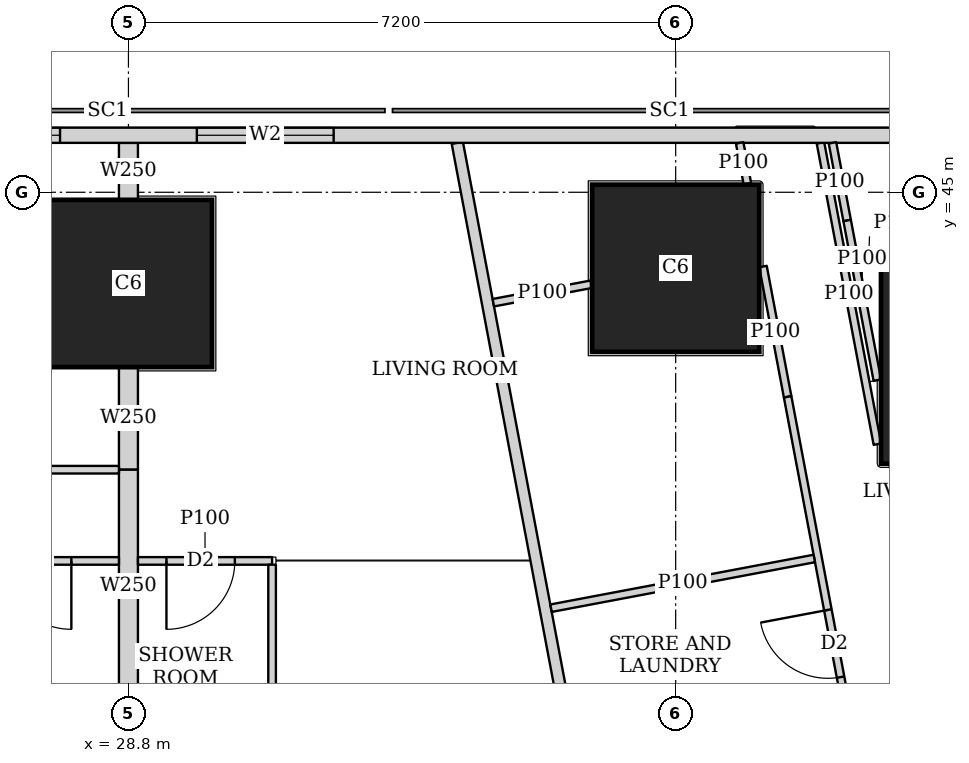
"""IFC4 building model, lengths in metres.
Left out: names, types, materials, properties, quantities, classifications, styles, units other than length and angle.
Written with IfcOpenShell. Run it as: python <this file> out.ifc"""

import sys

from ifc_helpers import new_model, si_unit, direction, frame, frame_2d, origin, origin_2d, place, context, subcontext, project, spatial, rectangle, extrude, element, fill, save


model = new_model("IFC4")
c1 = context("Model", 3, precision=1e-05, world=origin(), true_north=direction((0.0, 1.0)))
c2 = subcontext(c1, "Body", "Model", "MODEL_VIEW")
j1 = project(units=[si_unit("LENGTHUNIT", "METRE"), si_unit("PLANEANGLEUNIT", "RADIAN")], contexts=[c1])
p1 = place(None, origin())
s1 = spatial("IfcSite", under=j1, at=p1, CompositionType="ELEMENT")
p2 = place(p1, origin())
s2 = spatial("IfcBuilding", under=s1, at=p2, CompositionType="ELEMENT")
p3 = place(p2, frame((0.0, 0.0, 111.65)))
s3 = spatial("IfcBuildingStorey", under=s2, at=p3, CompositionType="ELEMENT", Elevation=111.65)
p4 = place(p3, frame((40.102, 42.83, 0.0), z_axis=(0.0, 0.0, 1.0), x_axis=(1.0, 0.0, 0.0)))
e1 = element("IfcColumn", 1, at=p4, inside=s3, PredefinedType="COLUMN", context=c2, shape_type="SweptSolid", body=[
    extrude(rectangle(XDim=2.8, YDim=2.8, at=origin_2d()), origin(), (0.0, 0.0, 1.0), 3.75),
])
for number, where, z_axis, x_axis in (
    (2, (28.8, 43.8, 0.0), (0.0, 0.0, 1.0), (1.0, 0.0, 0.0)),
    (3, (36.0, 44.0, 0.0), (0.0, 0.0, 1.0), (1.0, 0.0, 0.0)),
):
    element("IfcColumn", number, at=place(p3, frame(where, z_axis=z_axis, x_axis=x_axis)), inside=s3, PredefinedType="COLUMN", context=c2, shape_type="SweptSolid", body=[
        extrude(rectangle(XDim=2.2, YDim=2.2, at=origin_2d()), origin(), (0.0, 0.0, 1.0), 3.75),
    ])
p5 = place(p3, frame((40.106, 45.75, 0.0), z_axis=(0.0, 0.0, 1.0), x_axis=(-1.0, 0.0, 0.0)))
e4 = element("IfcWall", 4, at=p5, inside=s3, PredefinedType="SOLIDWALL", context=c2, shape_type="SweptSolid", body=[
    extrude(rectangle(XDim=37.943, YDim=0.2, at=frame_2d((18.971, 0.0))), origin(), (0.0, 0.0, 1.0), 3.5),
])
p6 = place(p5, frame((8.606, 0.0, 0.9)))
e5 = element("IfcOpeningElement", 5, at=p6, cuts=e4, PredefinedType="OPENING", context=c2, shape_type="SweptSolid", body=[
    extrude(rectangle(XDim=1.8, YDim=1.5, at=frame_2d((0.9, 0.75))), frame((0.0, 0.11, 0.0), z_axis=(0.0, -1.0, 0.0), x_axis=(1.0, 0.0, 0.0)), (0.0, 0.0, 1.0), 0.22),
])
p7 = place(p5, frame((12.206, 0.0, 0.9)))
e6 = element("IfcOpeningElement", 6, at=p7, cuts=e4, PredefinedType="OPENING", context=c2, shape_type="SweptSolid", body=[
    extrude(rectangle(XDim=1.8, YDim=1.5, at=frame_2d((0.9, 0.75))), frame((0.0, 0.11, 0.0), z_axis=(0.0, -1.0, 0.0), x_axis=(1.0, 0.0, 0.0)), (0.0, 0.0, 1.0), 0.22),
])
p8 = place(p5, frame((15.806, 0.0, 0.9)))
e7 = element("IfcOpeningElement", 7, at=p8, cuts=e4, PredefinedType="OPENING", context=c2, shape_type="SweptSolid", body=[
    extrude(rectangle(XDim=1.8, YDim=1.5, at=frame_2d((0.9, 0.75))), frame((0.0, 0.11, 0.0), z_axis=(0.0, -1.0, 0.0), x_axis=(1.0, 0.0, 0.0)), (0.0, 0.0, 1.0), 0.22),
])
p9 = place(p5, frame((19.406, 0.0, 0.9)))
e8 = element("IfcOpeningElement", 8, at=p9, cuts=e4, PredefinedType="OPENING", context=c2, shape_type="SweptSolid", body=[
    extrude(rectangle(XDim=1.8, YDim=1.5, at=frame_2d((0.9, 0.75))), frame((0.0, 0.11, 0.0), z_axis=(0.0, -1.0, 0.0), x_axis=(1.0, 0.0, 0.0)), (0.0, 0.0, 1.0), 0.22),
])
p10 = place(p5, frame((23.006, 0.0, 0.9)))
e9 = element("IfcOpeningElement", 9, at=p10, cuts=e4, PredefinedType="OPENING", context=c2, shape_type="SweptSolid", body=[
    extrude(rectangle(XDim=1.8, YDim=1.5, at=frame_2d((0.9, 0.75))), frame((0.0, 0.11, 0.0), z_axis=(0.0, -1.0, 0.0), x_axis=(1.0, 0.0, 0.0)), (0.0, 0.0, 1.0), 0.22),
])
p11 = place(p5, frame((26.606, 0.0, 0.9)))
e10 = element("IfcOpeningElement", 10, at=p11, cuts=e4, PredefinedType="OPENING", context=c2, shape_type="SweptSolid", body=[
    extrude(rectangle(XDim=1.8, YDim=1.5, at=frame_2d((0.9, 0.75))), frame((0.0, 0.11, 0.0), z_axis=(0.0, -1.0, 0.0), x_axis=(1.0, 0.0, 0.0)), (0.0, 0.0, 1.0), 0.22),
])
p12 = place(p3, frame((33.127, 45.65, 0.0), z_axis=(0.0, 0.0, 1.0), x_axis=(0.185598547723, -0.98262565562, 0.0)))
e11 = element("IfcWall", 11, at=p12, inside=s3, PredefinedType="SOLIDWALL", context=c2, shape_type="SweptSolid", body=[
    extrude(rectangle(XDim=47.118, YDim=0.15, at=frame_2d((23.559, 0.0))), origin(), (0.0, 0.0, 1.0), 2.2),
])
p13 = place(p12, frame((20.373, 0.0, 0.0)))
e12 = element("IfcOpeningElement", 12, at=p13, cuts=e11, PredefinedType="OPENING", context=c2, shape_type="SweptSolid", body=[
    extrude(rectangle(XDim=1.0, YDim=2.1, at=frame_2d((0.5, 1.05))), frame((0.0, 0.085, 0.0), z_axis=(0.0, -1.0, 0.0), x_axis=(1.0, 0.0, 0.0)), (0.0, 0.0, 1.0), 0.17),
])
p14 = place(p12, frame((24.188, 0.0, 0.0)))
e13 = element("IfcOpeningElement", 13, at=p14, cuts=e11, PredefinedType="OPENING", context=c2, shape_type="SweptSolid", body=[
    extrude(rectangle(XDim=1.0, YDim=2.1, at=frame_2d((0.5, 1.05))), frame((0.0, 0.085, 0.0), z_axis=(0.0, -1.0, 0.0), x_axis=(1.0, 0.0, 0.0)), (0.0, 0.0, 1.0), 0.17),
])
p15 = place(p12, frame((32.608, 0.0, 0.0)))
e14 = element("IfcOpeningElement", 14, at=p15, cuts=e11, PredefinedType="OPENING", context=c2, shape_type="SweptSolid", body=[
    extrude(rectangle(XDim=1.0, YDim=2.1, at=frame_2d((0.5, 1.05))), frame((0.0, 0.085, 0.0), z_axis=(0.0, -1.0, 0.0), x_axis=(1.0, 0.0, 0.0)), (0.0, 0.0, 1.0), 0.17),
])
p16 = place(p3, frame((38.654, 41.686, 0.0), z_axis=(0.0, 0.0, 1.0), x_axis=(-0.185676896978, 0.982610853761, 0.0)))
e15 = element("IfcWall", 15, at=p16, inside=s3, PredefinedType="PARTITIONING", context=c2, shape_type="SweptSolid", body=[
    extrude(rectangle(XDim=4.034, YDim=0.1, at=frame_2d((2.017, 0.0))), origin(), (0.0, 0.0, 1.0), 2.05),
])
p17 = place(p3, frame((38.063, 45.65, 0.0), z_axis=(0.0, 0.0, 1.0), x_axis=(0.185677287841, -0.982610779902, 0.0)))
e16 = element("IfcWall", 16, at=p17, inside=s3, PredefinedType="PARTITIONING", context=c2, shape_type="SweptSolid", body=[
    extrude(rectangle(XDim=1.04, YDim=0.1, at=frame_2d((0.52, 0.0))), origin(), (0.0, 0.0, 1.0), 3.5),
])
p18 = place(p3, frame((38.256, 44.628, 0.0), z_axis=(0.0, 0.0, 1.0), x_axis=(0.185757524649, -0.982595614704, 0.0)))
e17 = element("IfcWall", 17, at=p18, inside=s3, PredefinedType="PARTITIONING", context=c2, shape_type="SweptSolid", body=[
    extrude(rectangle(XDim=2.137, YDim=0.1, at=frame_2d((1.068, 0.0))), origin(), (0.0, 0.0, 1.0), 2.05),
])
p19 = place(p3, frame((38.862, 41.42, 0.0), z_axis=(0.0, 0.0, 1.0), x_axis=(0.185550092293, -0.982634806655, 0.0)))
e18 = element("IfcWall", 18, at=p19, inside=s3, PredefinedType="PARTITIONING", context=c2, shape_type="SweptSolid", body=[
    extrude(rectangle(XDim=12.384, YDim=0.1, at=frame_2d((6.192, 0.0))), origin(), (0.0, 0.0, 1.0), 2.5),
])
p20 = place(p19, frame((11.212, 0.0, 0.0)))
e19 = element("IfcOpeningElement", 19, at=p20, cuts=e18, PredefinedType="OPENING", context=c2, shape_type="SweptSolid", body=[
    extrude(rectangle(XDim=0.9, YDim=2.1, at=frame_2d((0.45, 1.05))), frame((0.0, 0.06, 0.0), z_axis=(0.0, -1.0, 0.0), x_axis=(1.0, 0.0, 0.0)), (0.0, 0.0, 1.0), 0.12),
])
p21 = place(p19, frame((7.555, 0.0, 0.0)))
e20 = element("IfcOpeningElement", 20, at=p21, cuts=e18, PredefinedType="OPENING", context=c2, shape_type="SweptSolid", body=[
    extrude(rectangle(XDim=0.9, YDim=2.1, at=frame_2d((0.45, 1.05))), frame((0.0, 0.06, 0.0), z_axis=(0.0, -1.0, 0.0), x_axis=(1.0, 0.0, 0.0)), (0.0, 0.0, 1.0), 0.12),
])
p22 = place(p19, frame((3.579, 0.0, 0.0)))
e21 = element("IfcOpeningElement", 21, at=p22, cuts=e18, PredefinedType="OPENING", context=c2, shape_type="SweptSolid", body=[
    extrude(rectangle(XDim=0.9, YDim=2.1, at=frame_2d((0.45, 1.05))), frame((0.0, 0.06, 0.0), z_axis=(0.0, -1.0, 0.0), x_axis=(1.0, 0.0, 0.0)), (0.0, 0.0, 1.0), 0.12),
])
p23 = place(p3, frame((36.842, 45.65, 0.0), z_axis=(0.0, 0.0, 1.0), x_axis=(0.185764109712, -0.98259436979, 0.0)))
e22 = element("IfcWall", 22, at=p23, inside=s3, PredefinedType="PARTITIONING", context=c2, shape_type="SweptSolid", body=[
    extrude(rectangle(XDim=0.549, YDim=0.1, at=frame_2d((0.275, 0.0))), origin(), (0.0, 0.0, 1.0), 3.5),
])
p24 = place(p3, frame((37.149, 44.023, 0.0), z_axis=(0.0, 0.0, 1.0), x_axis=(0.185741922314, -0.982598564163, 0.0)))
e23 = element("IfcWall", 23, at=p24, inside=s3, PredefinedType="PARTITIONING", context=c2, shape_type="SweptSolid", body=[
    extrude(rectangle(XDim=1.744, YDim=0.1, at=frame_2d((0.872, 0.0))), origin(), (0.0, 0.0, 1.0), 2.05),
])
p25 = place(p3, frame((37.473, 42.309, 0.0), z_axis=(0.0, 0.0, 1.0), x_axis=(0.185583982986, -0.982628406499, 0.0)))
e24 = element("IfcWall", 24, at=p25, inside=s3, PredefinedType="PARTITIONING", context=c2, shape_type="SweptSolid", body=[
    extrude(rectangle(XDim=14.825, YDim=0.1, at=frame_2d((7.412, 0.0))), origin(), (0.0, 0.0, 1.0), 2.5),
])
p26 = place(p25, frame((13.4, 0.0, 0.0)))
e25 = element("IfcOpeningElement", 25, at=p26, cuts=e24, PredefinedType="OPENING", context=c2, shape_type="SweptSolid", body=[
    extrude(rectangle(XDim=0.9, YDim=2.1, at=frame_2d((0.45, 1.05))), frame((0.0, 0.06, 0.0), z_axis=(0.0, -1.0, 0.0), x_axis=(1.0, 0.0, 0.0)), (0.0, 0.0, 1.0), 0.12),
])
p27 = place(p25, frame((9.808, 0.0, 0.0)))
e26 = element("IfcOpeningElement", 26, at=p27, cuts=e24, PredefinedType="OPENING", context=c2, shape_type="SweptSolid", body=[
    extrude(rectangle(XDim=0.9, YDim=2.1, at=frame_2d((0.45, 1.05))), frame((0.0, 0.06, 0.0), z_axis=(0.0, -1.0, 0.0), x_axis=(1.0, 0.0, 0.0)), (0.0, 0.0, 1.0), 0.12),
])
p28 = place(p25, frame((5.397, 0.0, 0.0)))
e27 = element("IfcOpeningElement", 27, at=p28, cuts=e24, PredefinedType="OPENING", context=c2, shape_type="SweptSolid", body=[
    extrude(rectangle(XDim=0.9, YDim=2.1, at=frame_2d((0.45, 1.05))), frame((0.0, 0.06, 0.0), z_axis=(0.0, -1.0, 0.0), x_axis=(1.0, 0.0, 0.0)), (0.0, 0.0, 1.0), 0.12),
])
p29 = place(p25, frame((2.853, 0.0, 0.0)))
e28 = element("IfcOpeningElement", 28, at=p29, cuts=e24, PredefinedType="OPENING", context=c2, shape_type="SweptSolid", body=[
    extrude(rectangle(XDim=0.9, YDim=2.1, at=frame_2d((0.45, 1.05))), frame((0.0, 0.06, 0.0), z_axis=(0.0, -1.0, 0.0), x_axis=(1.0, 0.0, 0.0)), (0.0, 0.0, 1.0), 0.12),
])
p30 = place(p25, frame((11.491, 0.0, 0.0)))
e29 = element("IfcOpeningElement", 29, at=p30, cuts=e24, PredefinedType="OPENING", context=c2, shape_type="SweptSolid", body=[
    extrude(rectangle(XDim=0.9, YDim=2.1, at=frame_2d((0.45, 1.05))), frame((0.0, 0.06, 0.0), z_axis=(0.0, -1.0, 0.0), x_axis=(1.0, 0.0, 0.0)), (0.0, 0.0, 1.0), 0.12),
])
p31 = place(p25, frame((7.9, 0.0, 0.0)))
e30 = element("IfcOpeningElement", 30, at=p31, cuts=e24, PredefinedType="OPENING", context=c2, shape_type="SweptSolid", body=[
    extrude(rectangle(XDim=0.9, YDim=2.1, at=frame_2d((0.45, 1.05))), frame((0.0, 0.06, 0.0), z_axis=(0.0, -1.0, 0.0), x_axis=(1.0, 0.0, 0.0)), (0.0, 0.0, 1.0), 0.12),
])
p32 = place(p3, frame((38.692, 44.23, 0.0), z_axis=(0.0, 0.0, 1.0), x_axis=(-0.982944840311, -0.183900627803, 0.0)))
e31 = element("IfcWall", 31, at=p32, inside=s3, PredefinedType="PARTITIONING", context=c2, shape_type="SweptSolid", body=[
    extrude(rectangle(XDim=0.304, YDim=0.1, at=frame_2d((0.152, 0.0))), origin(), (0.0, 0.0, 1.0), 2.05),
])
p33 = place(p3, frame((34.89, 43.79, 0.0), z_axis=(0.0, 0.0, 1.0), x_axis=(-0.982696831521, -0.185221319826, 0.0)))
e32 = element("IfcWall", 32, at=p33, inside=s3, PredefinedType="PARTITIONING", context=c2, shape_type="SweptSolid", body=[
    extrude(rectangle(XDim=1.312, YDim=0.1, at=frame_2d((0.656, 0.0))), origin(), (0.0, 0.0, 1.0), 2.05),
])
p34 = place(p3, frame((37.824, 40.182, 0.0), z_axis=(0.0, 0.0, 1.0), x_axis=(-0.982648794755, -0.185475998897, 0.0)))
e33 = element("IfcWall", 33, at=p34, inside=s3, PredefinedType="PARTITIONING", context=c2, shape_type="SweptSolid", body=[
    extrude(rectangle(XDim=3.525, YDim=0.1, at=frame_2d((1.763, 0.0))), origin(), (0.0, 0.0, 1.0), 3.5),
])
p35 = place(p3, frame((21.6, 41.35, 0.0), z_axis=(0.0, 0.0, 1.0), x_axis=(1.0, 0.0, 0.0)))
e34 = element("IfcWall", 34, at=p35, inside=s3, PredefinedType="PARTITIONING", context=c2, shape_type="SweptSolid", body=[
    extrude(rectangle(XDim=7.075, YDim=0.1, at=frame_2d((3.538, 0.0))), origin(), (0.0, 0.0, 1.0), 3.5),
])
p36 = place(p35, frame((0.2, 0.0, 0.0)))
e35 = element("IfcOpeningElement", 35, at=p36, cuts=e34, PredefinedType="OPENING", context=c2, shape_type="SweptSolid", body=[
    extrude(rectangle(XDim=0.9, YDim=2.1, at=frame_2d((0.45, 1.05))), frame((0.0, 0.06, 0.0), z_axis=(0.0, -1.0, 0.0), x_axis=(1.0, 0.0, 0.0)), (0.0, 0.0, 1.0), 0.12),
])
p37 = place(p35, frame((3.8, 0.0, 0.0)))
e36 = element("IfcOpeningElement", 36, at=p37, cuts=e34, PredefinedType="OPENING", context=c2, shape_type="SweptSolid", body=[
    extrude(rectangle(XDim=0.9, YDim=2.1, at=frame_2d((0.45, 1.05))), frame((0.0, 0.06, 0.0), z_axis=(0.0, -1.0, 0.0), x_axis=(1.0, 0.0, 0.0)), (0.0, 0.0, 1.0), 0.12),
])
p38 = place(p3, frame((21.6, 40.15, 0.0), z_axis=(0.0, 0.0, 1.0), x_axis=(1.0, 0.0, 0.0)))
e37 = element("IfcWall", 37, at=p38, inside=s3, PredefinedType="PARTITIONING", context=c2, shape_type="SweptSolid", body=[
    extrude(rectangle(XDim=7.075, YDim=0.1, at=frame_2d((3.538, 0.0))), origin(), (0.0, 0.0, 1.0), 3.5),
])
p39 = place(p38, frame((0.575, 0.0, 0.0)))
e38 = element("IfcOpeningElement", 38, at=p39, cuts=e37, PredefinedType="OPENING", context=c2, shape_type="SweptSolid", body=[
    extrude(rectangle(XDim=0.9, YDim=2.1, at=frame_2d((0.45, 1.05))), frame((0.0, 0.06, 0.0), z_axis=(0.0, -1.0, 0.0), x_axis=(1.0, 0.0, 0.0)), (0.0, 0.0, 1.0), 0.12),
])
p40 = place(p38, frame((5.549, 0.0, 0.0)))
e39 = element("IfcOpeningElement", 39, at=p40, cuts=e37, PredefinedType="OPENING", context=c2, shape_type="SweptSolid", body=[
    extrude(rectangle(XDim=0.9, YDim=2.1, at=frame_2d((0.45, 1.05))), frame((0.0, 0.06, 0.0), z_axis=(0.0, -1.0, 0.0), x_axis=(1.0, 0.0, 0.0)), (0.0, 0.0, 1.0), 0.12),
])
p41 = place(p38, frame((2.974, 0.0, 0.0)))
e40 = element("IfcOpeningElement", 40, at=p41, cuts=e37, PredefinedType="OPENING", context=c2, shape_type="SweptSolid", body=[
    extrude(rectangle(XDim=0.9, YDim=2.1, at=frame_2d((0.45, 1.05))), frame((0.0, 0.06, 0.0), z_axis=(0.0, -1.0, 0.0), x_axis=(1.0, 0.0, 0.0)), (0.0, 0.0, 1.0), 0.12),
])
p42 = place(p3, frame((28.925, 40.15, 0.0), z_axis=(0.0, 0.0, 1.0), x_axis=(1.0, 0.0, 0.0)))
e41 = element("IfcWall", 41, at=p42, inside=s3, PredefinedType="PARTITIONING", context=c2, shape_type="SweptSolid", body=[
    extrude(rectangle(XDim=1.765, YDim=0.1, at=frame_2d((0.882, 0.0))), origin(), (0.0, 0.0, 1.0), 3.5),
])
p43 = place(p42, frame((0.375, 0.0, 0.0)))
e42 = element("IfcOpeningElement", 42, at=p43, cuts=e41, PredefinedType="OPENING", context=c2, shape_type="SweptSolid", body=[
    extrude(rectangle(XDim=0.9, YDim=2.1, at=frame_2d((0.45, 1.05))), frame((0.0, 0.06, 0.0), z_axis=(0.0, -1.0, 0.0), x_axis=(1.0, 0.0, 0.0)), (0.0, 0.0, 1.0), 0.12),
])
p44 = place(p3, frame((30.69, 36.575, 0.0), z_axis=(0.0, 0.0, 1.0), x_axis=(0.0, 1.0, 0.0)))
e43 = element("IfcWall", 43, at=p44, inside=s3, PredefinedType="PARTITIONING", context=c2, shape_type="SweptSolid", body=[
    extrude(rectangle(XDim=3.525, YDim=0.1, at=frame_2d((1.763, 0.0))), origin(), (0.0, 0.0, 1.0), 3.5),
])
p45 = place(p3, frame((28.8, 41.35, 0.0), z_axis=(0.0, 0.0, 1.0), x_axis=(0.0, 1.0, 0.0)))
e44 = element("IfcWall", 44, at=p45, inside=s3, PredefinedType="SOLIDWALL", context=c2, shape_type="SweptSolid", body=[
    extrude(rectangle(XDim=1.349, YDim=0.25, at=frame_2d((0.674, 0.0))), origin(), (0.0, 0.0, 1.0), 3.5),
])
p46 = place(p3, frame((28.8, 44.901, 0.0), z_axis=(0.0, 0.0, 1.0), x_axis=(0.0, 1.0, 0.0)))
e45 = element("IfcWall", 45, at=p46, inside=s3, PredefinedType="SOLIDWALL", context=c2, shape_type="SweptSolid", body=[
    extrude(rectangle(XDim=0.749, YDim=0.25, at=frame_2d((0.375, 0.0))), origin(), (0.0, 0.0, 1.0), 3.5),
])
p47 = place(p3, frame((28.8, 38.301, 0.0), z_axis=(0.0, 0.0, 1.0), x_axis=(0.0, 1.0, 0.0)))
e46 = element("IfcWall", 46, at=p47, inside=s3, PredefinedType="SOLIDWALL", context=c2, shape_type="SweptSolid", body=[
    extrude(rectangle(XDim=3.049, YDim=0.25, at=frame_2d((1.524, 0.0))), origin(), (0.0, 0.0, 1.0), 3.5),
])
p48 = place(p6, origin())
e47 = element("IfcWindow", 47, at=p48, inside=s3, PartitioningType="SINGLE_PANEL", PredefinedType="WINDOW", context=c2, shape_type="SweptSolid", body=[
    extrude(rectangle(XDim=1.8, YDim=1.5, at=frame_2d((0.9, 0.75))), frame((0.0, 0.03, 0.0), z_axis=(0.0, -1.0, 0.0), x_axis=(1.0, 0.0, 0.0)), (0.0, 0.0, 1.0), 0.06),
])
fill(e5, e47)
p49 = place(p7, origin())
e48 = element("IfcWindow", 48, at=p49, inside=s3, PartitioningType="SINGLE_PANEL", PredefinedType="WINDOW", context=c2, shape_type="SweptSolid", body=[
    extrude(rectangle(XDim=1.8, YDim=1.5, at=frame_2d((0.9, 0.75))), frame((0.0, 0.03, 0.0), z_axis=(0.0, -1.0, 0.0), x_axis=(1.0, 0.0, 0.0)), (0.0, 0.0, 1.0), 0.06),
])
fill(e6, e48)
p50 = place(p29, origin())
e49 = element("IfcDoor", 49, at=p50, inside=s3, OperationType="SINGLE_SWING_RIGHT", PredefinedType="DOOR", context=c2, shape_type="SweptSolid", body=[
    extrude(rectangle(XDim=0.9, YDim=2.1, at=frame_2d((0.45, 1.05))), frame((0.0, 0.025, 0.0), z_axis=(0.0, -1.0, 0.0), x_axis=(1.0, 0.0, 0.0)), (0.0, 0.0, 1.0), 0.05),
])
fill(e28, e49)
p51 = place(p40, origin())
e50 = element("IfcDoor", 50, at=p51, inside=s3, OperationType="SINGLE_SWING_LEFT", PredefinedType="DOOR", context=c2, shape_type="SweptSolid", body=[
    extrude(rectangle(XDim=0.9, YDim=2.1, at=frame_2d((0.45, 1.05))), frame((0.0, 0.025, 0.0), z_axis=(0.0, -1.0, 0.0), x_axis=(1.0, 0.0, 0.0)), (0.0, 0.0, 1.0), 0.05),
])
fill(e39, e50)
p52 = place(p43, origin())
e51 = element("IfcDoor", 51, at=p52, inside=s3, OperationType="SINGLE_SWING_RIGHT", PredefinedType="DOOR", context=c2, shape_type="SweptSolid", body=[
    extrude(rectangle(XDim=0.9, YDim=2.1, at=frame_2d((0.45, 1.05))), frame((0.0, 0.025, 0.0), z_axis=(0.0, -1.0, 0.0), x_axis=(1.0, 0.0, 0.0)), (0.0, 0.0, 1.0), 0.05),
])
fill(e42, e51)
save(model, sys.argv[1])
